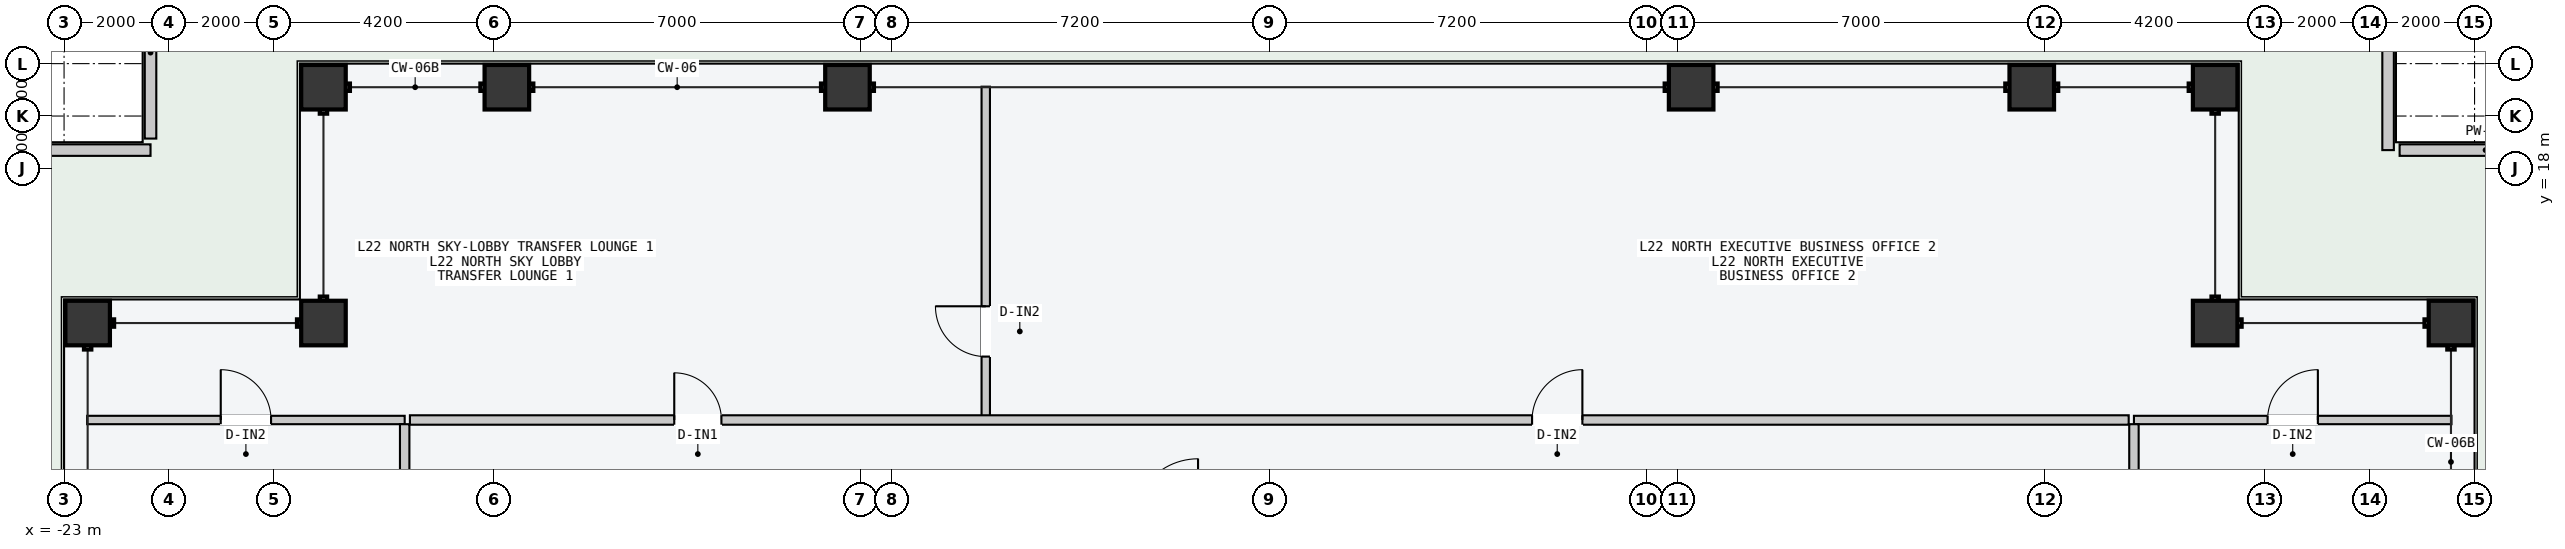
"""IFC4 building model, lengths in metres.
Left out: names, types, materials, properties, quantities, classifications, styles, units other than length and angle.
Written with IfcOpenShell. Run it as: python <this file> out.ifc"""

import sys

from ifc_helpers import new_model, si_unit, direction, frame, frame_2d, origin, origin_2d, place, context, subcontext, project, spatial, rectangle, hollow_rectangle, extrude, element, fill, save


model = new_model("IFC4")
c1 = context("Model", 3, precision=1e-05, world=origin(), true_north=direction((0.0, 1.0)))
c2 = subcontext(c1, "Body", "Model", "MODEL_VIEW")
j1 = project(units=[si_unit("LENGTHUNIT", "METRE"), si_unit("PLANEANGLEUNIT", "RADIAN")], contexts=[c1])
p1 = place(None, origin())
s1 = spatial("IfcSite", under=j1, at=p1, CompositionType="ELEMENT")
p2 = place(p1, origin())
s2 = spatial("IfcBuilding", under=s1, at=p2, CompositionType="ELEMENT")
p3 = place(p2, frame((0.0, 0.0, 87.3)))
s3 = spatial("IfcBuildingStorey", under=s2, at=p3, CompositionType="ELEMENT", Elevation=87.3)
for number, where, z_axis, x_axis in (
    (1, (-18.05, 19.55, -0.2), (0.0, 0.0, 1.0), (1.0, 0.0, 0.0)),
    (2, (-14.55, 19.55, -0.2), (0.0, 0.0, 1.0), (1.0, 0.0, 0.0)),
    (3, (-8.05, 19.55, -0.2), (0.0, 0.0, 1.0), (1.0, 0.0, 0.0)),
    (4, (8.05, 19.55, -0.2), (0.0, 0.0, 1.0), (1.0, 0.0, 0.0)),
    (5, (14.55, 19.55, -0.2), (0.0, 0.0, 1.0), (1.0, 0.0, 0.0)),
    (6, (18.05, 19.55, -0.2), (0.0, 0.0, 1.0), (1.0, 0.0, 0.0)),
    (7, (-22.55, 15.05, -0.2), (0.0, 0.0, 1.0), (0.0, 1.0, 0.0)),
    (8, (22.55, 15.05, -0.2), (0.0, 0.0, 1.0), (0.0, 1.0, 0.0)),
    (9, (-18.05, 15.05, -0.2), (0.0, 0.0, 1.0), (1.0, 0.0, 0.0)),
    (10, (18.05, 15.05, -0.2), (0.0, 0.0, 1.0), (1.0, 0.0, 0.0)),
):
    element("IfcColumn", number, at=place(p3, frame(where, z_axis=z_axis, x_axis=x_axis)), inside=s3, PredefinedType="COLUMN", context=c2, shape_type="SweptSolid", body=[
        extrude(hollow_rectangle(XDim=0.85, YDim=0.85, WallThickness=0.04, at=origin_2d()), origin(), (0.0, 0.0, 1.0), 4.7),
    ])
p4 = place(p3, frame((24.85, 18.35, 0.0), z_axis=(0.0, 0.0, 1.0), x_axis=(-1.0, 0.0, 0.0)))
e11 = element("IfcWall", 11, at=p4, inside=s3, PredefinedType="PARAPET", context=c2, shape_type="SweptSolid", body=[
    extrude(rectangle(XDim=3.28, YDim=0.22, at=frame_2d((1.64, 0.0))), origin(), (0.0, 0.0, 1.0), 1.2),
])
p5 = place(p3, frame((21.35, 18.35, 0.0), z_axis=(0.0, 0.0, 1.0), x_axis=(0.0, 1.0, 0.0)))
e12 = element("IfcWall", 12, at=p5, inside=s3, PredefinedType="PARAPET", context=c2, shape_type="SweptSolid", body=[
    extrude(rectangle(XDim=3.28, YDim=0.22, at=frame_2d((1.64, 0.0))), origin(), (0.0, 0.0, 1.0), 1.2),
])
p6 = place(p3, frame((-21.35, 21.85, 0.0), z_axis=(0.0, 0.0, 1.0), x_axis=(0.0, -1.0, 0.0)))
e13 = element("IfcWall", 13, at=p6, inside=s3, PredefinedType="PARAPET", context=c2, shape_type="SweptSolid", body=[
    extrude(rectangle(XDim=3.28, YDim=0.22, at=frame_2d((1.64, 0.0))), origin(), (0.0, 0.0, 1.0), 1.2),
])
p7 = place(p3, frame((-21.35, 18.35, 0.0), z_axis=(0.0, 0.0, 1.0), x_axis=(-1.0, 0.0, 0.0)))
e14 = element("IfcWall", 14, at=p7, inside=s3, PredefinedType="PARAPET", context=c2, shape_type="SweptSolid", body=[
    extrude(rectangle(XDim=3.28, YDim=0.22, at=frame_2d((1.64, 0.0))), origin(), (0.0, 0.0, 1.0), 1.2),
])
p8 = place(p3, frame((-5.411, 13.26, 0.0), z_axis=(0.0, 0.0, 1.0), x_axis=(0.0, 1.0, 0.0)))
e15 = element("IfcWall", 15, at=p8, inside=s3, PredefinedType="PARTITIONING", context=c2, shape_type="SweptSolid", body=[
    extrude(rectangle(XDim=6.3, YDim=0.16, at=frame_2d((3.15, 0.0))), origin(), (0.0, 0.0, 1.0), 4.3),
])
p9 = place(p8, frame((1.15, 0.0, 0.0)))
e16 = element("IfcOpeningElement", 16, at=p9, cuts=e15, PredefinedType="OPENING", context=c2, shape_type="SweptSolid", body=[
    extrude(rectangle(XDim=0.96, YDim=2.18, at=frame_2d((0.48, 1.09))), frame((0.0, 0.09, 0.0), z_axis=(0.0, -1.0, 0.0), x_axis=(1.0, 0.0, 0.0)), (0.0, 0.0, 1.0), 0.18),
])
p10 = place(p3, frame((-16.4, 13.2, 0.0), z_axis=(0.0, 0.0, 1.0), x_axis=(1.0, 0.0, 0.0)))
e17 = element("IfcWall", 17, at=p10, inside=s3, PredefinedType="PARTITIONING", context=c2, shape_type="SweptSolid", body=[
    extrude(rectangle(XDim=32.8, YDim=0.18, at=frame_2d((16.4, 0.0))), origin(), (0.0, 0.0, 1.0), 4.3),
])
p11 = place(p10, frame((5.044, 0.0, 0.0)))
e18 = element("IfcOpeningElement", 18, at=p11, cuts=e17, PredefinedType="OPENING", context=c2, shape_type="SweptSolid", body=[
    extrude(rectangle(XDim=0.9, YDim=2.15, at=frame_2d((0.45, 1.075))), frame((0.0, 0.1, 0.0), z_axis=(0.0, -1.0, 0.0), x_axis=(1.0, 0.0, 0.0)), (0.0, 0.0, 1.0), 0.2),
])
p12 = place(p10, frame((21.414, 0.0, 0.0)))
e19 = element("IfcOpeningElement", 19, at=p12, cuts=e17, PredefinedType="OPENING", context=c2, shape_type="SweptSolid", body=[
    extrude(rectangle(XDim=0.96, YDim=2.18, at=frame_2d((0.48, 1.09))), frame((0.0, 0.1, 0.0), z_axis=(0.0, -1.0, 0.0), x_axis=(1.0, 0.0, 0.0)), (0.0, 0.0, 1.0), 0.2),
])
p13 = place(p3, frame((-22.56, 13.2, 0.0), z_axis=(0.0, 0.0, 1.0), x_axis=(1.0, 0.0, 0.0)))
e20 = element("IfcWall", 20, at=p13, inside=s3, PredefinedType="PARTITIONING", context=c2, shape_type="SweptSolid", body=[
    extrude(rectangle(XDim=6.06, YDim=0.16, at=frame_2d((3.03, 0.0))), origin(), (0.0, 0.0, 1.0), 4.3),
])
p14 = place(p13, frame((2.55, 0.0, 0.0)))
e21 = element("IfcOpeningElement", 21, at=p14, cuts=e20, PredefinedType="OPENING", context=c2, shape_type="SweptSolid", body=[
    extrude(rectangle(XDim=0.96, YDim=2.18, at=frame_2d((0.48, 1.09))), frame((0.0, 0.09, 0.0), z_axis=(0.0, -1.0, 0.0), x_axis=(1.0, 0.0, 0.0)), (0.0, 0.0, 1.0), 0.18),
])
p15 = place(p3, frame((16.5, 13.2, 0.0), z_axis=(0.0, 0.0, 1.0), x_axis=(1.0, 0.0, 0.0)))
e22 = element("IfcWall", 22, at=p15, inside=s3, PredefinedType="PARTITIONING", context=c2, shape_type="SweptSolid", body=[
    extrude(rectangle(XDim=6.06, YDim=0.16, at=frame_2d((3.03, 0.0))), origin(), (0.0, 0.0, 1.0), 4.3),
])
p16 = place(p15, frame((2.55, 0.0, 0.0)))
e23 = element("IfcOpeningElement", 23, at=p16, cuts=e22, PredefinedType="OPENING", context=c2, shape_type="SweptSolid", body=[
    extrude(rectangle(XDim=0.96, YDim=2.18, at=frame_2d((0.48, 1.09))), frame((0.0, 0.09, 0.0), z_axis=(0.0, -1.0, 0.0), x_axis=(1.0, 0.0, 0.0)), (0.0, 0.0, 1.0), 0.18),
])
p17 = place(p3, frame((-16.5, -13.12, 0.0), z_axis=(0.0, 0.0, 1.0), x_axis=(0.0, 1.0, 0.0)))
e24 = element("IfcWall", 24, at=p17, inside=s3, PredefinedType="PARTITIONING", context=c2, shape_type="SweptSolid", body=[
    extrude(rectangle(XDim=26.24, YDim=0.18, at=frame_2d((13.12, 0.0))), origin(), (0.0, 0.0, 1.0), 4.3),
])
p18 = place(p17, frame((5.031, 0.0, 0.0)))
e25 = element("IfcOpeningElement", 25, at=p18, cuts=e24, PredefinedType="OPENING", context=c2, shape_type="SweptSolid", body=[
    extrude(rectangle(XDim=0.96, YDim=2.18, at=frame_2d((0.48, 1.09))), frame((0.0, 0.1, 0.0), z_axis=(0.0, -1.0, 0.0), x_axis=(1.0, 0.0, 0.0)), (0.0, 0.0, 1.0), 0.2),
])
p19 = place(p17, frame((18.12, 0.0, 0.0)))
e26 = element("IfcOpeningElement", 26, at=p19, cuts=e24, PredefinedType="OPENING", context=c2, shape_type="SweptSolid", body=[
    extrude(rectangle(XDim=1.02, YDim=2.2, at=frame_2d((0.51, 1.1))), frame((0.0, 0.1, 0.0), z_axis=(0.0, -1.0, 0.0), x_axis=(1.0, 0.0, 0.0)), (0.0, 0.0, 1.0), 0.2),
])
p20 = place(p3, frame((16.5, -13.12, 0.0), z_axis=(0.0, 0.0, 1.0), x_axis=(0.0, 1.0, 0.0)))
e27 = element("IfcWall", 27, at=p20, inside=s3, PredefinedType="PARTITIONING", context=c2, shape_type="SweptSolid", body=[
    extrude(rectangle(XDim=26.24, YDim=0.18, at=frame_2d((13.12, 0.0))), origin(), (0.0, 0.0, 1.0), 4.3),
])
p21 = place(p20, frame((12.64, 0.0, 0.0)))
e28 = element("IfcOpeningElement", 28, at=p21, cuts=e27, PredefinedType="OPENING", context=c2, shape_type="SweptSolid", body=[
    extrude(rectangle(XDim=0.96, YDim=2.18, at=frame_2d((0.48, 1.09))), frame((0.0, 0.1, 0.0), z_axis=(0.0, -1.0, 0.0), x_axis=(1.0, 0.0, 0.0)), (0.0, 0.0, 1.0), 0.2),
])
p22 = place(p9, origin())
e29 = element("IfcDoor", 29, at=p22, inside=s3, OperationType="SINGLE_SWING_RIGHT", PredefinedType="DOOR", context=c2, shape_type="SweptSolid", body=[
    extrude(rectangle(XDim=0.96, YDim=2.18, at=frame_2d((0.48, 1.09))), frame((0.0, 0.025, 0.0), z_axis=(0.0, -1.0, 0.0), x_axis=(1.0, 0.0, 0.0)), (0.0, 0.0, 1.0), 0.05),
])
fill(e16, e29)
p23 = place(p11, origin())
e30 = element("IfcDoor", 30, at=p23, inside=s3, OperationType="SINGLE_SWING_LEFT", PredefinedType="DOOR", context=c2, shape_type="SweptSolid", body=[
    extrude(rectangle(XDim=0.9, YDim=2.15, at=frame_2d((0.45, 1.075))), frame((0.0, 0.025, 0.0), z_axis=(0.0, -1.0, 0.0), x_axis=(1.0, 0.0, 0.0)), (0.0, 0.0, 1.0), 0.05),
])
fill(e18, e30)
p24 = place(p12, origin())
e31 = element("IfcDoor", 31, at=p24, inside=s3, OperationType="SINGLE_SWING_RIGHT", PredefinedType="DOOR", context=c2, shape_type="SweptSolid", body=[
    extrude(rectangle(XDim=0.96, YDim=2.18, at=frame_2d((0.48, 1.09))), frame((0.0, 0.025, 0.0), z_axis=(0.0, -1.0, 0.0), x_axis=(1.0, 0.0, 0.0)), (0.0, 0.0, 1.0), 0.05),
])
fill(e19, e31)
p25 = place(p14, origin())
e32 = element("IfcDoor", 32, at=p25, inside=s3, OperationType="SINGLE_SWING_LEFT", PredefinedType="DOOR", context=c2, shape_type="SweptSolid", body=[
    extrude(rectangle(XDim=0.96, YDim=2.18, at=frame_2d((0.48, 1.09))), frame((0.0, 0.025, 0.0), z_axis=(0.0, -1.0, 0.0), x_axis=(1.0, 0.0, 0.0)), (0.0, 0.0, 1.0), 0.05),
])
fill(e21, e32)
p26 = place(p16, origin())
e33 = element("IfcDoor", 33, at=p26, inside=s3, OperationType="SINGLE_SWING_RIGHT", PredefinedType="DOOR", context=c2, shape_type="SweptSolid", body=[
    extrude(rectangle(XDim=0.96, YDim=2.18, at=frame_2d((0.48, 1.09))), frame((0.0, 0.025, 0.0), z_axis=(0.0, -1.0, 0.0), x_axis=(1.0, 0.0, 0.0)), (0.0, 0.0, 1.0), 0.05),
])
fill(e23, e33)
save(model, sys.argv[1])
